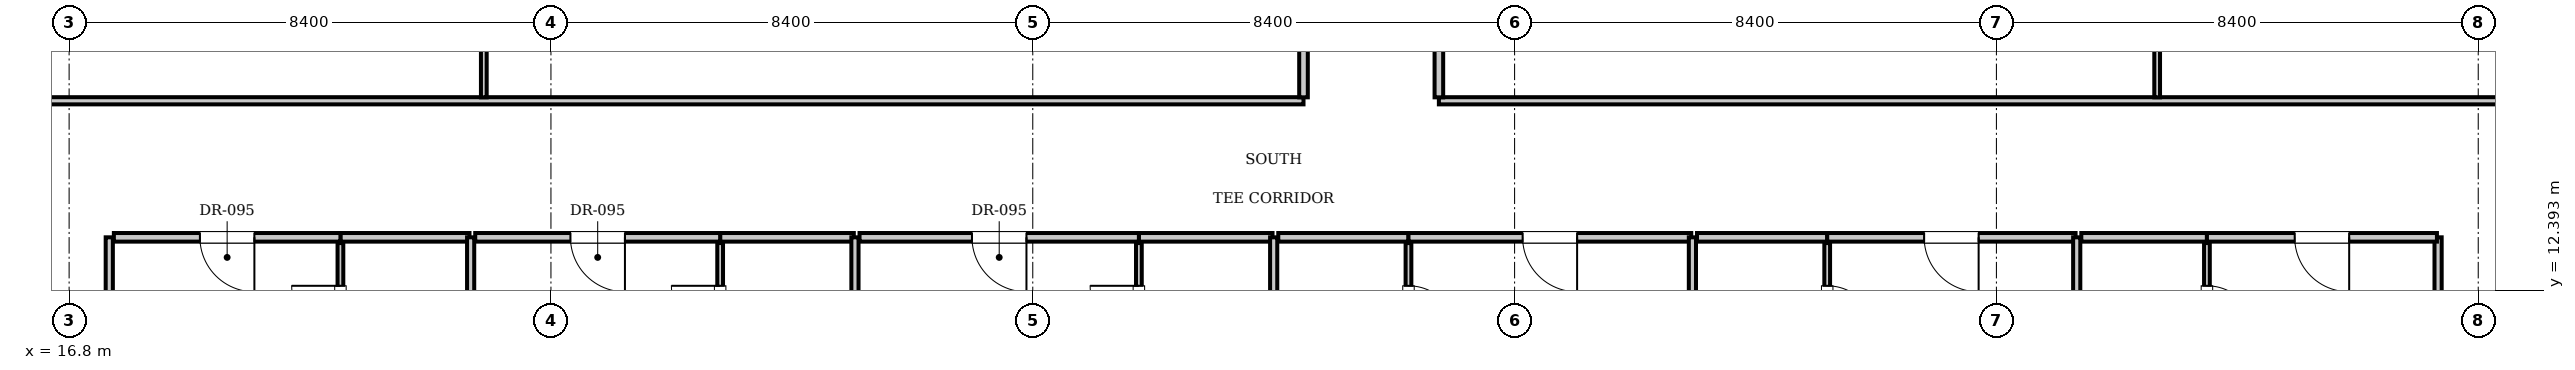
"""IFC4 building model, lengths in metres.
Left out: names, types, materials, properties, quantities, classifications, styles, units other than length and angle.
Written with IfcOpenShell. Run it as: python <this file> out.ifc"""

import sys

from ifc_helpers import new_model, si_unit, direction, frame, frame_2d, origin, place, context, subcontext, project, spatial, rectangle, extrude, element, fill, save


model = new_model("IFC4")
c1 = context("Model", 3, precision=1e-05, world=origin(), true_north=direction((0.0, 1.0)))
c2 = subcontext(c1, "Body", "Model", "MODEL_VIEW")
j1 = project(units=[si_unit("LENGTHUNIT", "METRE"), si_unit("PLANEANGLEUNIT", "RADIAN")], contexts=[c1])
p1 = place(None, origin())
s1 = spatial("IfcSite", under=j1, at=p1, CompositionType="ELEMENT")
p2 = place(p1, origin())
s2 = spatial("IfcBuilding", under=s1, at=p2, CompositionType="ELEMENT")
p3 = place(p2, frame((0.0, 0.0, 204.4)))
s3 = spatial("IfcBuildingStorey", under=s2, at=p3, CompositionType="ELEMENT", Elevation=204.4)
for number, where, z_axis, x_axis in (
    (1, (17.5, 9.0, 0.0), (0.0, 0.0, 1.0), (0.0, 1.0, 0.0)),
    (2, (58.1, 9.0, 0.0), (0.0, 0.0, 1.0), (0.0, 1.0, 0.0)),
):
    element("IfcWall", number, at=place(p3, frame(where, z_axis=z_axis, x_axis=x_axis)), inside=s3, PredefinedType="PARTITIONING", context=c2, shape_type="SweptSolid", body=[
        extrude(rectangle(XDim=4.32, YDim=0.125, at=frame_2d((2.16, 0.0))), origin(), (0.0, 0.0, 1.0), 3.61),
    ])
p4 = place(p3, frame((21.53, 13.32, 0.0), z_axis=(0.0, 0.0, 1.0), x_axis=(1.0, 0.0, 0.0)))
e3 = element("IfcWall", 3, at=p4, inside=s3, PredefinedType="PARTITIONING", context=c2, shape_type="SweptSolid", body=[
    extrude(rectangle(XDim=2.25, YDim=0.15, at=frame_2d((1.125, 0.0))), origin(), (0.0, 0.0, 1.0), 3.61),
])
p5 = place(p3, frame((21.53, 10.88, 0.0), z_axis=(0.0, 0.0, 1.0), x_axis=(0.0, 1.0, 0.0)))
e4 = element("IfcWall", 4, at=p5, inside=s3, PredefinedType="PARTITIONING", context=c2, shape_type="SweptSolid", body=[
    extrude(rectangle(XDim=2.34, YDim=0.1, at=frame_2d((1.17, 0.0))), origin(), (0.0, 0.0, 1.0), 3.61),
])
p6 = place(p5, frame((0.745, 0.0, 0.0)))
e5 = element("IfcOpeningElement", 5, at=p6, cuts=e4, PredefinedType="OPENING", context=c2, shape_type="SweptSolid", body=[
    extrude(rectangle(XDim=0.85, YDim=2.1, at=frame_2d((0.425, 1.05))), frame((0.0, 0.06, 0.0), z_axis=(0.0, -1.0, 0.0), x_axis=(1.0, 0.0, 0.0)), (0.0, 0.0, 1.0), 0.12),
])
p7 = place(p3, frame((17.58, 13.32, 0.0), z_axis=(0.0, 0.0, 1.0), x_axis=(1.0, 0.0, 0.0)))
e6 = element("IfcWall", 6, at=p7, inside=s3, PredefinedType="PARTITIONING", context=c2, shape_type="SweptSolid", body=[
    extrude(rectangle(XDim=3.95, YDim=0.15, at=frame_2d((1.975, 0.0))), origin(), (0.0, 0.0, 1.0), 3.61),
])
p8 = place(p7, frame((1.5, 0.0, 0.0)))
e7 = element("IfcOpeningElement", 7, at=p8, cuts=e6, PredefinedType="OPENING", context=c2, shape_type="SweptSolid", body=[
    extrude(rectangle(XDim=0.95, YDim=2.15, at=frame_2d((0.475, 1.075))), frame((0.0, 0.085, 0.0), z_axis=(0.0, -1.0, 0.0), x_axis=(1.0, 0.0, 0.0)), (0.0, 0.0, 1.0), 0.17),
])
p9 = place(p3, frame((23.8, 4.7, 0.0), z_axis=(0.0, 0.0, 1.0), x_axis=(0.0, 1.0, 0.0)))
e8 = element("IfcWall", 8, at=p9, inside=s3, PredefinedType="PARTITIONING", context=c2, shape_type="SweptSolid", body=[
    extrude(rectangle(XDim=8.62, YDim=0.125, at=frame_2d((4.31, 0.0))), origin(), (0.0, 0.0, 1.0), 3.61),
])
p10 = place(p3, frame((28.15, 13.32, 0.0), z_axis=(0.0, 0.0, 1.0), x_axis=(1.0, 0.0, 0.0)))
e9 = element("IfcWall", 9, at=p10, inside=s3, PredefinedType="PARTITIONING", context=c2, shape_type="SweptSolid", body=[
    extrude(rectangle(XDim=2.33, YDim=0.15, at=frame_2d((1.165, 0.0))), origin(), (0.0, 0.0, 1.0), 3.61),
])
p11 = place(p3, frame((28.15, 10.88, 0.0), z_axis=(0.0, 0.0, 1.0), x_axis=(0.0, 1.0, 0.0)))
e10 = element("IfcWall", 10, at=p11, inside=s3, PredefinedType="PARTITIONING", context=c2, shape_type="SweptSolid", body=[
    extrude(rectangle(XDim=2.34, YDim=0.1, at=frame_2d((1.17, 0.0))), origin(), (0.0, 0.0, 1.0), 3.61),
])
p12 = place(p11, frame((0.745, 0.0, 0.0)))
e11 = element("IfcOpeningElement", 11, at=p12, cuts=e10, PredefinedType="OPENING", context=c2, shape_type="SweptSolid", body=[
    extrude(rectangle(XDim=0.85, YDim=2.1, at=frame_2d((0.425, 1.05))), frame((0.0, 0.06, 0.0), z_axis=(0.0, -1.0, 0.0), x_axis=(1.0, 0.0, 0.0)), (0.0, 0.0, 1.0), 0.12),
])
p13 = place(p3, frame((23.88, 13.32, 0.0), z_axis=(0.0, 0.0, 1.0), x_axis=(1.0, 0.0, 0.0)))
e12 = element("IfcWall", 12, at=p13, inside=s3, PredefinedType="PARTITIONING", context=c2, shape_type="SweptSolid", body=[
    extrude(rectangle(XDim=4.27, YDim=0.15, at=frame_2d((2.135, 0.0))), origin(), (0.0, 0.0, 1.0), 3.61),
])
p14 = place(p13, frame((1.66, 0.0, 0.0)))
e13 = element("IfcOpeningElement", 13, at=p14, cuts=e12, PredefinedType="OPENING", context=c2, shape_type="SweptSolid", body=[
    extrude(rectangle(XDim=0.95, YDim=2.15, at=frame_2d((0.475, 1.075))), frame((0.0, 0.085, 0.0), z_axis=(0.0, -1.0, 0.0), x_axis=(1.0, 0.0, 0.0)), (0.0, 0.0, 1.0), 0.17),
])
p15 = place(p3, frame((30.5, 4.7, 0.0), z_axis=(0.0, 0.0, 1.0), x_axis=(0.0, 1.0, 0.0)))
e14 = element("IfcWall", 14, at=p15, inside=s3, PredefinedType="PARTITIONING", context=c2, shape_type="SweptSolid", body=[
    extrude(rectangle(XDim=8.62, YDim=0.125, at=frame_2d((4.31, 0.0))), origin(), (0.0, 0.0, 1.0), 3.61),
])
p16 = place(p3, frame((35.45, 13.32, 0.0), z_axis=(0.0, 0.0, 1.0), x_axis=(1.0, 0.0, 0.0)))
e15 = element("IfcWall", 15, at=p16, inside=s3, PredefinedType="PARTITIONING", context=c2, shape_type="SweptSolid", body=[
    extrude(rectangle(XDim=2.33, YDim=0.15, at=frame_2d((1.165, 0.0))), origin(), (0.0, 0.0, 1.0), 3.61),
])
p17 = place(p3, frame((35.45, 10.88, 0.0), z_axis=(0.0, 0.0, 1.0), x_axis=(0.0, 1.0, 0.0)))
e16 = element("IfcWall", 16, at=p17, inside=s3, PredefinedType="PARTITIONING", context=c2, shape_type="SweptSolid", body=[
    extrude(rectangle(XDim=2.34, YDim=0.1, at=frame_2d((1.17, 0.0))), origin(), (0.0, 0.0, 1.0), 3.61),
])
p18 = place(p17, frame((0.745, 0.0, 0.0)))
e17 = element("IfcOpeningElement", 17, at=p18, cuts=e16, PredefinedType="OPENING", context=c2, shape_type="SweptSolid", body=[
    extrude(rectangle(XDim=0.85, YDim=2.1, at=frame_2d((0.425, 1.05))), frame((0.0, 0.06, 0.0), z_axis=(0.0, -1.0, 0.0), x_axis=(1.0, 0.0, 0.0)), (0.0, 0.0, 1.0), 0.12),
])
p19 = place(p3, frame((30.58, 13.32, 0.0), z_axis=(0.0, 0.0, 1.0), x_axis=(1.0, 0.0, 0.0)))
e18 = element("IfcWall", 18, at=p19, inside=s3, PredefinedType="PARTITIONING", context=c2, shape_type="SweptSolid", body=[
    extrude(rectangle(XDim=4.87, YDim=0.15, at=frame_2d((2.435, 0.0))), origin(), (0.0, 0.0, 1.0), 3.61),
])
p20 = place(p19, frame((1.96, 0.0, 0.0)))
e19 = element("IfcOpeningElement", 19, at=p20, cuts=e18, PredefinedType="OPENING", context=c2, shape_type="SweptSolid", body=[
    extrude(rectangle(XDim=0.95, YDim=2.15, at=frame_2d((0.475, 1.075))), frame((0.0, 0.085, 0.0), z_axis=(0.0, -1.0, 0.0), x_axis=(1.0, 0.0, 0.0)), (0.0, 0.0, 1.0), 0.17),
])
p21 = place(p3, frame((37.8, 4.7, 0.0), z_axis=(0.0, 0.0, 1.0), x_axis=(0.0, 1.0, 0.0)))
e20 = element("IfcWall", 20, at=p21, inside=s3, PredefinedType="PARTITIONING", context=c2, shape_type="SweptSolid", body=[
    extrude(rectangle(XDim=8.62, YDim=0.125, at=frame_2d((4.31, 0.0))), origin(), (0.0, 0.0, 1.0), 3.403),
])
p22 = place(p3, frame((37.88, 13.32, 0.0), z_axis=(0.0, 0.0, 1.0), x_axis=(1.0, 0.0, 0.0)))
e21 = element("IfcWall", 21, at=p22, inside=s3, PredefinedType="PARTITIONING", context=c2, shape_type="SweptSolid", body=[
    extrude(rectangle(XDim=2.27, YDim=0.15, at=frame_2d((1.135, 0.0))), origin(), (0.0, 0.0, 1.0), 3.61),
])
p23 = place(p3, frame((40.15, 10.88, 0.0), z_axis=(0.0, 0.0, 1.0), x_axis=(0.0, 1.0, 0.0)))
e22 = element("IfcWall", 22, at=p23, inside=s3, PredefinedType="PARTITIONING", context=c2, shape_type="SweptSolid", body=[
    extrude(rectangle(XDim=2.34, YDim=0.1, at=frame_2d((1.17, 0.0))), origin(), (0.0, 0.0, 1.0), 3.61),
])
p24 = place(p23, frame((0.745, 0.0, 0.0)))
e23 = element("IfcOpeningElement", 23, at=p24, cuts=e22, PredefinedType="OPENING", context=c2, shape_type="SweptSolid", body=[
    extrude(rectangle(XDim=0.85, YDim=2.1, at=frame_2d((0.425, 1.05))), frame((0.0, 0.06, 0.0), z_axis=(0.0, -1.0, 0.0), x_axis=(1.0, 0.0, 0.0)), (0.0, 0.0, 1.0), 0.12),
])
p25 = place(p3, frame((40.15, 13.32, 0.0), z_axis=(0.0, 0.0, 1.0), x_axis=(1.0, 0.0, 0.0)))
e24 = element("IfcWall", 24, at=p25, inside=s3, PredefinedType="PARTITIONING", context=c2, shape_type="SweptSolid", body=[
    extrude(rectangle(XDim=4.93, YDim=0.15, at=frame_2d((2.465, 0.0))), origin(), (0.0, 0.0, 1.0), 3.61),
])
p26 = place(p25, frame((1.99, 0.0, 0.0)))
e25 = element("IfcOpeningElement", 25, at=p26, cuts=e24, PredefinedType="OPENING", context=c2, shape_type="SweptSolid", body=[
    extrude(rectangle(XDim=0.95, YDim=2.15, at=frame_2d((0.475, 1.075))), frame((0.0, 0.085, 0.0), z_axis=(0.0, -1.0, 0.0), x_axis=(1.0, 0.0, 0.0)), (0.0, 0.0, 1.0), 0.17),
])
p27 = place(p3, frame((45.1, 4.7, 0.0), z_axis=(0.0, 0.0, 1.0), x_axis=(0.0, 1.0, 0.0)))
e26 = element("IfcWall", 26, at=p27, inside=s3, PredefinedType="PARTITIONING", context=c2, shape_type="SweptSolid", body=[
    extrude(rectangle(XDim=8.62, YDim=0.125, at=frame_2d((4.31, 0.0))), origin(), (0.0, 0.0, 1.0), 3.61),
])
p28 = place(p3, frame((45.18, 13.32, 0.0), z_axis=(0.0, 0.0, 1.0), x_axis=(1.0, 0.0, 0.0)))
e27 = element("IfcWall", 27, at=p28, inside=s3, PredefinedType="PARTITIONING", context=c2, shape_type="SweptSolid", body=[
    extrude(rectangle(XDim=2.27, YDim=0.15, at=frame_2d((1.135, 0.0))), origin(), (0.0, 0.0, 1.0), 3.61),
])
p29 = place(p3, frame((47.45, 10.88, 0.0), z_axis=(0.0, 0.0, 1.0), x_axis=(0.0, 1.0, 0.0)))
e28 = element("IfcWall", 28, at=p29, inside=s3, PredefinedType="PARTITIONING", context=c2, shape_type="SweptSolid", body=[
    extrude(rectangle(XDim=2.34, YDim=0.1, at=frame_2d((1.17, 0.0))), origin(), (0.0, 0.0, 1.0), 3.61),
])
p30 = place(p29, frame((0.745, 0.0, 0.0)))
e29 = element("IfcOpeningElement", 29, at=p30, cuts=e28, PredefinedType="OPENING", context=c2, shape_type="SweptSolid", body=[
    extrude(rectangle(XDim=0.85, YDim=2.1, at=frame_2d((0.425, 1.05))), frame((0.0, 0.06, 0.0), z_axis=(0.0, -1.0, 0.0), x_axis=(1.0, 0.0, 0.0)), (0.0, 0.0, 1.0), 0.12),
])
p31 = place(p3, frame((47.45, 13.32, 0.0), z_axis=(0.0, 0.0, 1.0), x_axis=(1.0, 0.0, 0.0)))
e30 = element("IfcWall", 30, at=p31, inside=s3, PredefinedType="PARTITIONING", context=c2, shape_type="SweptSolid", body=[
    extrude(rectangle(XDim=4.33, YDim=0.15, at=frame_2d((2.165, 0.0))), origin(), (0.0, 0.0, 1.0), 3.61),
])
p32 = place(p31, frame((1.69, 0.0, 0.0)))
e31 = element("IfcOpeningElement", 31, at=p32, cuts=e30, PredefinedType="OPENING", context=c2, shape_type="SweptSolid", body=[
    extrude(rectangle(XDim=0.95, YDim=2.15, at=frame_2d((0.475, 1.075))), frame((0.0, 0.085, 0.0), z_axis=(0.0, -1.0, 0.0), x_axis=(1.0, 0.0, 0.0)), (0.0, 0.0, 1.0), 0.17),
])
p33 = place(p3, frame((51.8, 4.7, 0.0), z_axis=(0.0, 0.0, 1.0), x_axis=(0.0, 1.0, 0.0)))
e32 = element("IfcWall", 32, at=p33, inside=s3, PredefinedType="PARTITIONING", context=c2, shape_type="SweptSolid", body=[
    extrude(rectangle(XDim=8.62, YDim=0.125, at=frame_2d((4.31, 0.0))), origin(), (0.0, 0.0, 1.0), 3.61),
])
p34 = place(p3, frame((51.88, 13.32, 0.0), z_axis=(0.0, 0.0, 1.0), x_axis=(1.0, 0.0, 0.0)))
e33 = element("IfcWall", 33, at=p34, inside=s3, PredefinedType="PARTITIONING", context=c2, shape_type="SweptSolid", body=[
    extrude(rectangle(XDim=2.19, YDim=0.15, at=frame_2d((1.095, 0.0))), origin(), (0.0, 0.0, 1.0), 3.61),
])
p35 = place(p3, frame((54.07, 10.88, 0.0), z_axis=(0.0, 0.0, 1.0), x_axis=(0.0, 1.0, 0.0)))
e34 = element("IfcWall", 34, at=p35, inside=s3, PredefinedType="PARTITIONING", context=c2, shape_type="SweptSolid", body=[
    extrude(rectangle(XDim=2.34, YDim=0.1, at=frame_2d((1.17, 0.0))), origin(), (0.0, 0.0, 1.0), 3.61),
])
p36 = place(p35, frame((0.745, 0.0, 0.0)))
e35 = element("IfcOpeningElement", 35, at=p36, cuts=e34, PredefinedType="OPENING", context=c2, shape_type="SweptSolid", body=[
    extrude(rectangle(XDim=0.85, YDim=2.1, at=frame_2d((0.425, 1.05))), frame((0.0, 0.06, 0.0), z_axis=(0.0, -1.0, 0.0), x_axis=(1.0, 0.0, 0.0)), (0.0, 0.0, 1.0), 0.12),
])
p37 = place(p3, frame((54.07, 13.32, 0.0), z_axis=(0.0, 0.0, 1.0), x_axis=(1.0, 0.0, 0.0)))
e36 = element("IfcWall", 36, at=p37, inside=s3, PredefinedType="PARTITIONING", context=c2, shape_type="SweptSolid", body=[
    extrude(rectangle(XDim=4.01, YDim=0.15, at=frame_2d((2.005, 0.0))), origin(), (0.0, 0.0, 1.0), 3.61),
])
p38 = place(p37, frame((1.53, 0.0, 0.0)))
e37 = element("IfcOpeningElement", 37, at=p38, cuts=e36, PredefinedType="OPENING", context=c2, shape_type="SweptSolid", body=[
    extrude(rectangle(XDim=0.95, YDim=2.15, at=frame_2d((0.475, 1.075))), frame((0.0, 0.085, 0.0), z_axis=(0.0, -1.0, 0.0), x_axis=(1.0, 0.0, 0.0)), (0.0, 0.0, 1.0), 0.17),
])
p39 = place(p3, frame((13.2, 15.7, 0.0), z_axis=(0.0, 0.0, 1.0), x_axis=(1.0, 0.0, 0.0)))
e38 = element("IfcWall", 38, at=p39, inside=s3, PredefinedType="PARTITIONING", context=c2, shape_type="SweptSolid", body=[
    extrude(rectangle(XDim=25.12, YDim=0.125, at=frame_2d((12.56, 0.0))), origin(), (0.0, 0.0, 1.0), 3.61),
])
p40 = place(p3, frame((40.68, 15.7, 0.0), z_axis=(0.0, 0.0, 1.0), x_axis=(1.0, 0.0, 0.0)))
e39 = element("IfcWall", 39, at=p40, inside=s3, PredefinedType="PARTITIONING", context=c2, shape_type="SweptSolid", body=[
    extrude(rectangle(XDim=21.72, YDim=0.125, at=frame_2d((10.86, 0.0))), origin(), (0.0, 0.0, 1.0), 3.61),
])
p41 = place(p3, frame((38.32, 15.76, 0.0), z_axis=(0.0, 0.0, 1.0), x_axis=(0.0, 1.0, 0.0)))
e40 = element("IfcWall", 40, at=p41, inside=s3, PredefinedType="PARTITIONING", context=c2, shape_type="SweptSolid", body=[
    extrude(rectangle(XDim=5.14, YDim=0.15, at=frame_2d((2.57, 0.0))), origin(), (0.0, 0.0, 1.0), 3.61),
])
p42 = place(p41, frame((2.095, 0.0, 0.0)))
e41 = element("IfcOpeningElement", 41, at=p42, cuts=e40, PredefinedType="OPENING", context=c2, shape_type="SweptSolid", body=[
    extrude(rectangle(XDim=0.95, YDim=2.15, at=frame_2d((0.475, 1.075))), frame((0.0, 0.085, 0.0), z_axis=(0.0, -1.0, 0.0), x_axis=(1.0, 0.0, 0.0)), (0.0, 0.0, 1.0), 0.17),
])
p43 = place(p3, frame((24.03, 15.76, 0.0), z_axis=(0.0, 0.0, 1.0), x_axis=(0.0, 1.0, 0.0)))
e42 = element("IfcWall", 42, at=p43, inside=s3, PredefinedType="PARTITIONING", context=c2, shape_type="SweptSolid", body=[
    extrude(rectangle(XDim=7.43, YDim=0.1, at=frame_2d((3.715, 0.0))), origin(), (0.0, 0.0, 1.0), 3.61),
])
p44 = place(p43, frame((3.265, 0.0, 0.0)))
e43 = element("IfcOpeningElement", 43, at=p44, cuts=e42, PredefinedType="OPENING", context=c2, shape_type="SweptSolid", body=[
    extrude(rectangle(XDim=0.9, YDim=2.1, at=frame_2d((0.45, 1.05))), frame((0.0, 0.06, 0.0), z_axis=(0.0, -1.0, 0.0), x_axis=(1.0, 0.0, 0.0)), (0.0, 0.0, 1.0), 0.12),
])
p45 = place(p3, frame((40.68, 15.76, 0.0), z_axis=(0.0, 0.0, 1.0), x_axis=(0.0, 1.0, 0.0)))
e44 = element("IfcWall", 44, at=p45, inside=s3, PredefinedType="PARTITIONING", context=c2, shape_type="SweptSolid", body=[
    extrude(rectangle(XDim=5.14, YDim=0.15, at=frame_2d((2.57, 0.0))), origin(), (0.0, 0.0, 1.0), 3.61),
])
p46 = place(p45, frame((3.055, 0.0, 0.0)))
e45 = element("IfcOpeningElement", 45, at=p46, cuts=e44, PredefinedType="OPENING", context=c2, shape_type="SweptSolid", body=[
    extrude(rectangle(XDim=0.95, YDim=2.15, at=frame_2d((0.475, 1.075))), frame((0.0, 0.085, 0.0), z_axis=(0.0, -1.0, 0.0), x_axis=(1.0, 0.0, 0.0)), (0.0, 0.0, 1.0), 0.17),
])
p47 = place(p3, frame((53.202, 15.76, 0.0), z_axis=(0.0, 0.0, 1.0), x_axis=(0.0, 1.0, 0.0)))
e46 = element("IfcWall", 46, at=p47, inside=s3, PredefinedType="PARTITIONING", context=c2, shape_type="SweptSolid", body=[
    extrude(rectangle(XDim=7.43, YDim=0.1, at=frame_2d((3.715, 0.0))), origin(), (0.0, 0.0, 1.0), 3.61),
])
p48 = place(p47, frame((3.265, 0.0, 0.0)))
e47 = element("IfcOpeningElement", 47, at=p48, cuts=e46, PredefinedType="OPENING", context=c2, shape_type="SweptSolid", body=[
    extrude(rectangle(XDim=0.9, YDim=2.1, at=frame_2d((0.45, 1.05))), frame((0.0, 0.06, 0.0), z_axis=(0.0, -1.0, 0.0), x_axis=(1.0, 0.0, 0.0)), (0.0, 0.0, 1.0), 0.12),
])
p49 = place(p6, origin())
e48 = element("IfcDoor", 48, at=p49, inside=s3, OperationType="SINGLE_SWING_RIGHT", PredefinedType="DOOR", context=c2, shape_type="SweptSolid", body=[
    extrude(rectangle(XDim=0.85, YDim=2.1, at=frame_2d((0.425, 1.05))), frame((0.0, 0.025, 0.0), z_axis=(0.0, -1.0, 0.0), x_axis=(1.0, 0.0, 0.0)), (0.0, 0.0, 1.0), 0.05),
])
fill(e5, e48)
p50 = place(p8, frame((0.95, 0.0, 0.0), z_axis=(0.0, 0.0, 1.0), x_axis=(-1.0, 0.0, 0.0)))
e49 = element("IfcDoor", 49, at=p50, inside=s3, OperationType="SINGLE_SWING_LEFT", PredefinedType="DOOR", context=c2, shape_type="SweptSolid", body=[
    extrude(rectangle(XDim=0.95, YDim=2.15, at=frame_2d((0.475, 1.075))), frame((0.0, 0.025, 0.0), z_axis=(0.0, -1.0, 0.0), x_axis=(1.0, 0.0, 0.0)), (0.0, 0.0, 1.0), 0.05),
])
fill(e7, e49)
p51 = place(p12, origin())
e50 = element("IfcDoor", 50, at=p51, inside=s3, OperationType="SINGLE_SWING_RIGHT", PredefinedType="DOOR", context=c2, shape_type="SweptSolid", body=[
    extrude(rectangle(XDim=0.85, YDim=2.1, at=frame_2d((0.425, 1.05))), frame((0.0, 0.025, 0.0), z_axis=(0.0, -1.0, 0.0), x_axis=(1.0, 0.0, 0.0)), (0.0, 0.0, 1.0), 0.05),
])
fill(e11, e50)
p52 = place(p14, frame((0.95, 0.0, 0.0), z_axis=(0.0, 0.0, 1.0), x_axis=(-1.0, 0.0, 0.0)))
e51 = element("IfcDoor", 51, at=p52, inside=s3, OperationType="SINGLE_SWING_LEFT", PredefinedType="DOOR", context=c2, shape_type="SweptSolid", body=[
    extrude(rectangle(XDim=0.95, YDim=2.15, at=frame_2d((0.475, 1.075))), frame((0.0, 0.025, 0.0), z_axis=(0.0, -1.0, 0.0), x_axis=(1.0, 0.0, 0.0)), (0.0, 0.0, 1.0), 0.05),
])
fill(e13, e51)
p53 = place(p18, origin())
e52 = element("IfcDoor", 52, at=p53, inside=s3, OperationType="SINGLE_SWING_RIGHT", PredefinedType="DOOR", context=c2, shape_type="SweptSolid", body=[
    extrude(rectangle(XDim=0.85, YDim=2.1, at=frame_2d((0.425, 1.05))), frame((0.0, 0.025, 0.0), z_axis=(0.0, -1.0, 0.0), x_axis=(1.0, 0.0, 0.0)), (0.0, 0.0, 1.0), 0.05),
])
fill(e17, e52)
p54 = place(p20, frame((0.95, 0.0, 0.0), z_axis=(0.0, 0.0, 1.0), x_axis=(-1.0, 0.0, 0.0)))
e53 = element("IfcDoor", 53, at=p54, inside=s3, OperationType="SINGLE_SWING_LEFT", PredefinedType="DOOR", context=c2, shape_type="SweptSolid", body=[
    extrude(rectangle(XDim=0.95, YDim=2.15, at=frame_2d((0.475, 1.075))), frame((0.0, 0.025, 0.0), z_axis=(0.0, -1.0, 0.0), x_axis=(1.0, 0.0, 0.0)), (0.0, 0.0, 1.0), 0.05),
])
fill(e19, e53)
p55 = place(p24, frame((0.85, 0.0, 0.0), z_axis=(0.0, 0.0, 1.0), x_axis=(-1.0, 0.0, 0.0)))
e54 = element("IfcDoor", 54, at=p55, inside=s3, OperationType="SINGLE_SWING_RIGHT", PredefinedType="DOOR", context=c2, shape_type="SweptSolid", body=[
    extrude(rectangle(XDim=0.85, YDim=2.1, at=frame_2d((0.425, 1.05))), frame((0.0, 0.025, 0.0), z_axis=(0.0, -1.0, 0.0), x_axis=(1.0, 0.0, 0.0)), (0.0, 0.0, 1.0), 0.05),
])
fill(e23, e54)
p56 = place(p26, frame((0.95, 0.0, 0.0), z_axis=(0.0, 0.0, 1.0), x_axis=(-1.0, 0.0, 0.0)))
e55 = element("IfcDoor", 55, at=p56, inside=s3, OperationType="SINGLE_SWING_LEFT", PredefinedType="DOOR", context=c2, shape_type="SweptSolid", body=[
    extrude(rectangle(XDim=0.95, YDim=2.15, at=frame_2d((0.475, 1.075))), frame((0.0, 0.025, 0.0), z_axis=(0.0, -1.0, 0.0), x_axis=(1.0, 0.0, 0.0)), (0.0, 0.0, 1.0), 0.05),
])
fill(e25, e55)
p57 = place(p30, frame((0.85, 0.0, 0.0), z_axis=(0.0, 0.0, 1.0), x_axis=(-1.0, 0.0, 0.0)))
e56 = element("IfcDoor", 56, at=p57, inside=s3, OperationType="SINGLE_SWING_RIGHT", PredefinedType="DOOR", context=c2, shape_type="SweptSolid", body=[
    extrude(rectangle(XDim=0.85, YDim=2.1, at=frame_2d((0.425, 1.05))), frame((0.0, 0.025, 0.0), z_axis=(0.0, -1.0, 0.0), x_axis=(1.0, 0.0, 0.0)), (0.0, 0.0, 1.0), 0.05),
])
fill(e29, e56)
p58 = place(p32, frame((0.95, 0.0, 0.0), z_axis=(0.0, 0.0, 1.0), x_axis=(-1.0, 0.0, 0.0)))
e57 = element("IfcDoor", 57, at=p58, inside=s3, OperationType="SINGLE_SWING_LEFT", PredefinedType="DOOR", context=c2, shape_type="SweptSolid", body=[
    extrude(rectangle(XDim=0.95, YDim=2.15, at=frame_2d((0.475, 1.075))), frame((0.0, 0.025, 0.0), z_axis=(0.0, -1.0, 0.0), x_axis=(1.0, 0.0, 0.0)), (0.0, 0.0, 1.0), 0.05),
])
fill(e31, e57)
p59 = place(p36, frame((0.85, 0.0, 0.0), z_axis=(0.0, 0.0, 1.0), x_axis=(-1.0, 0.0, 0.0)))
e58 = element("IfcDoor", 58, at=p59, inside=s3, OperationType="SINGLE_SWING_RIGHT", PredefinedType="DOOR", context=c2, shape_type="SweptSolid", body=[
    extrude(rectangle(XDim=0.85, YDim=2.1, at=frame_2d((0.425, 1.05))), frame((0.0, 0.025, 0.0), z_axis=(0.0, -1.0, 0.0), x_axis=(1.0, 0.0, 0.0)), (0.0, 0.0, 1.0), 0.05),
])
fill(e35, e58)
p60 = place(p38, frame((0.95, 0.0, 0.0), z_axis=(0.0, 0.0, 1.0), x_axis=(-1.0, 0.0, 0.0)))
e59 = element("IfcDoor", 59, at=p60, inside=s3, OperationType="SINGLE_SWING_LEFT", PredefinedType="DOOR", context=c2, shape_type="SweptSolid", body=[
    extrude(rectangle(XDim=0.95, YDim=2.15, at=frame_2d((0.475, 1.075))), frame((0.0, 0.025, 0.0), z_axis=(0.0, -1.0, 0.0), x_axis=(1.0, 0.0, 0.0)), (0.0, 0.0, 1.0), 0.05),
])
fill(e37, e59)
save(model, sys.argv[1])
